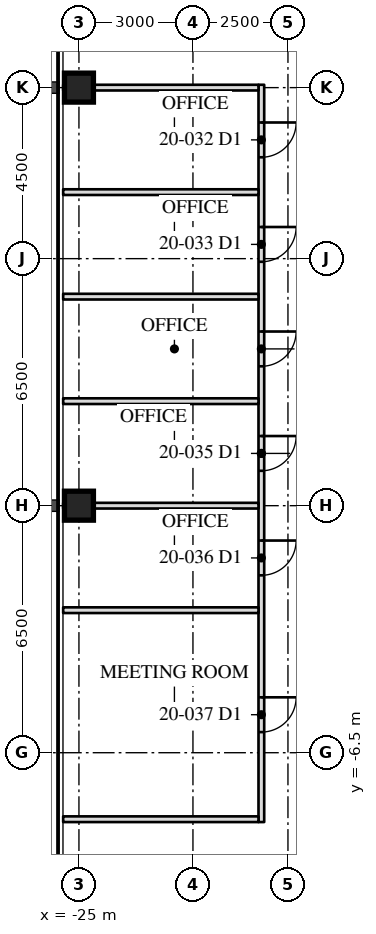
"""IFC4 building model, lengths in metres.
Left out: names, types, materials, properties, quantities, classifications, styles, units other than length and angle.
Written with IfcOpenShell. Run it as: python <this file> out.ifc"""

import sys

from ifc_helpers import new_model, si_unit, direction, frame, frame_2d, origin, origin_2d, place, context, subcontext, project, spatial, rectangle, hollow_rectangle, extrude, element, fill, save


model = new_model("IFC4")
c1 = context("Model", 3, precision=1e-05, world=origin(), true_north=direction((0.0, 1.0)))
c2 = subcontext(c1, "Body", "Model", "MODEL_VIEW")
j1 = project(units=[si_unit("LENGTHUNIT", "METRE"), si_unit("PLANEANGLEUNIT", "RADIAN")], contexts=[c1])
p1 = place(None, origin())
s1 = spatial("IfcSite", under=j1, at=p1, CompositionType="ELEMENT")
p2 = place(p1, origin())
s2 = spatial("IfcBuilding", under=s1, at=p2, CompositionType="ELEMENT")
p3 = place(p2, frame((0.0, 0.0, 85.7)))
s3 = spatial("IfcBuildingStorey", under=s2, at=p3, CompositionType="ELEMENT", Elevation=85.7)
for number, where, z_axis, x_axis in (
    (1, (-25.0, 0.0, 0.0), (0.0, 0.0, 1.0), (0.0, 1.0, 0.0)),
    (2, (-25.0, 11.0, 0.0), (0.0, 0.0, 1.0), (0.0, 1.0, 0.0)),
):
    element("IfcColumn", number, at=place(p3, frame(where, z_axis=z_axis, x_axis=x_axis)), inside=s3, PredefinedType="COLUMN", context=c2, shape_type="SweptSolid", body=[
        extrude(hollow_rectangle(XDim=0.762, YDim=0.762, WallThickness=0.127, at=origin_2d()), origin(), (0.0, 0.0, 1.0), 4.1),
    ])
p4 = place(p3, frame((-20.2, 11.075, 0.0), z_axis=(0.0, 0.0, 1.0), x_axis=(0.0, -1.0, 0.0)))
e3 = element("IfcWall", 3, at=p4, inside=s3, PredefinedType="PARTITIONING", context=c2, shape_type="SweptSolid", body=[
    extrude(rectangle(XDim=19.4, YDim=0.15, at=frame_2d((9.7, 0.0))), origin(), (0.0, 0.0, 1.0), 3.91),
])
p5 = place(p4, frame((0.992, 0.0, 0.0)))
e4 = element("IfcOpeningElement", 4, at=p5, cuts=e3, PredefinedType="OPENING", context=c2, shape_type="SweptSolid", body=[
    extrude(rectangle(XDim=0.915, YDim=2.134, at=frame_2d((0.458, 1.067))), frame((0.0, 0.085, 0.0), z_axis=(0.0, -1.0, 0.0), x_axis=(1.0, 0.0, 0.0)), (0.0, 0.0, 1.0), 0.17),
])
p6 = place(p4, frame((3.742, 0.0, 0.0)))
e5 = element("IfcOpeningElement", 5, at=p6, cuts=e3, PredefinedType="OPENING", context=c2, shape_type="SweptSolid", body=[
    extrude(rectangle(XDim=0.915, YDim=2.134, at=frame_2d((0.458, 1.067))), frame((0.0, 0.085, 0.0), z_axis=(0.0, -1.0, 0.0), x_axis=(1.0, 0.0, 0.0)), (0.0, 0.0, 1.0), 0.17),
])
p7 = place(p4, frame((6.492, 0.0, 0.0)))
e6 = element("IfcOpeningElement", 6, at=p7, cuts=e3, PredefinedType="OPENING", context=c2, shape_type="SweptSolid", body=[
    extrude(rectangle(XDim=0.915, YDim=2.134, at=frame_2d((0.458, 1.067))), frame((0.0, 0.085, 0.0), z_axis=(0.0, -1.0, 0.0), x_axis=(1.0, 0.0, 0.0)), (0.0, 0.0, 1.0), 0.17),
])
p8 = place(p4, frame((9.242, 0.0, 0.0)))
e7 = element("IfcOpeningElement", 7, at=p8, cuts=e3, PredefinedType="OPENING", context=c2, shape_type="SweptSolid", body=[
    extrude(rectangle(XDim=0.915, YDim=2.134, at=frame_2d((0.458, 1.067))), frame((0.0, 0.085, 0.0), z_axis=(0.0, -1.0, 0.0), x_axis=(1.0, 0.0, 0.0)), (0.0, 0.0, 1.0), 0.17),
])
p9 = place(p4, frame((11.992, 0.0, 0.0)))
e8 = element("IfcOpeningElement", 8, at=p9, cuts=e3, PredefinedType="OPENING", context=c2, shape_type="SweptSolid", body=[
    extrude(rectangle(XDim=0.915, YDim=2.134, at=frame_2d((0.458, 1.067))), frame((0.0, 0.085, 0.0), z_axis=(0.0, -1.0, 0.0), x_axis=(1.0, 0.0, 0.0)), (0.0, 0.0, 1.0), 0.17),
])
p10 = place(p4, frame((16.117, 0.0, 0.0)))
e9 = element("IfcOpeningElement", 9, at=p10, cuts=e3, PredefinedType="OPENING", context=c2, shape_type="SweptSolid", body=[
    extrude(rectangle(XDim=0.915, YDim=2.134, at=frame_2d((0.458, 1.067))), frame((0.0, 0.085, 0.0), z_axis=(0.0, -1.0, 0.0), x_axis=(1.0, 0.0, 0.0)), (0.0, 0.0, 1.0), 0.17),
])
p11 = place(p3, frame((-20.275, 11.0, 0.0), z_axis=(0.0, 0.0, 1.0), x_axis=(-1.0, 0.0, 0.0)))
e10 = element("IfcWall", 10, at=p11, inside=s3, PredefinedType="PARTITIONING", context=c2, shape_type="SweptSolid", body=[
    extrude(rectangle(XDim=5.14, YDim=0.15, at=frame_2d((2.57, 0.0))), origin(), (0.0, 0.0, 1.0), 3.301),
])
for number, where, z_axis, x_axis in (
    (11, (-20.275, 8.25, 0.0), (0.0, 0.0, 1.0), (-1.0, 0.0, 0.0)),
    (12, (-20.275, 5.5, 0.0), (0.0, 0.0, 1.0), (-1.0, 0.0, 0.0)),
    (13, (-20.275, 2.75, 0.0), (0.0, 0.0, 1.0), (-1.0, 0.0, 0.0)),
):
    element("IfcWall", number, at=place(p3, frame(where, z_axis=z_axis, x_axis=x_axis)), inside=s3, PredefinedType="PARTITIONING", context=c2, shape_type="SweptSolid", body=[
        extrude(rectangle(XDim=5.14, YDim=0.15, at=frame_2d((2.57, 0.0))), origin(), (0.0, 0.0, 1.0), 3.91),
    ])
p12 = place(p3, frame((-20.275, 0.0, 0.0), z_axis=(0.0, 0.0, 1.0), x_axis=(-1.0, 0.0, 0.0)))
e14 = element("IfcWall", 14, at=p12, inside=s3, PredefinedType="PARTITIONING", context=c2, shape_type="SweptSolid", body=[
    extrude(rectangle(XDim=5.14, YDim=0.15, at=frame_2d((2.57, 0.0))), origin(), (0.0, 0.0, 1.0), 3.301),
])
for number, where, z_axis, x_axis in (
    (15, (-20.275, -2.75, 0.0), (0.0, 0.0, 1.0), (-1.0, 0.0, 0.0)),
    (16, (-20.275, -8.25, 0.0), (0.0, 0.0, 1.0), (-1.0, 0.0, 0.0)),
):
    element("IfcWall", number, at=place(p3, frame(where, z_axis=z_axis, x_axis=x_axis)), inside=s3, PredefinedType="PARTITIONING", context=c2, shape_type="SweptSolid", body=[
        extrude(rectangle(XDim=5.14, YDim=0.15, at=frame_2d((2.57, 0.0))), origin(), (0.0, 0.0, 1.0), 3.91),
    ])
p13 = place(p5, origin())
e17 = element("IfcDoor", 17, at=p13, inside=s3, OperationType="SINGLE_SWING_LEFT", PredefinedType="DOOR", context=c2, shape_type="SweptSolid", body=[
    extrude(rectangle(XDim=0.915, YDim=2.134, at=frame_2d((0.458, 1.067))), frame((0.0, 0.025, 0.0), z_axis=(0.0, -1.0, 0.0), x_axis=(1.0, 0.0, 0.0)), (0.0, 0.0, 1.0), 0.05),
])
fill(e4, e17)
p14 = place(p6, origin())
e18 = element("IfcDoor", 18, at=p14, inside=s3, OperationType="SINGLE_SWING_LEFT", PredefinedType="DOOR", context=c2, shape_type="SweptSolid", body=[
    extrude(rectangle(XDim=0.915, YDim=2.134, at=frame_2d((0.458, 1.067))), frame((0.0, 0.025, 0.0), z_axis=(0.0, -1.0, 0.0), x_axis=(1.0, 0.0, 0.0)), (0.0, 0.0, 1.0), 0.05),
])
fill(e5, e18)
p15 = place(p7, origin())
e19 = element("IfcDoor", 19, at=p15, inside=s3, OperationType="SINGLE_SWING_LEFT", PredefinedType="DOOR", context=c2, shape_type="SweptSolid", body=[
    extrude(rectangle(XDim=0.915, YDim=2.134, at=frame_2d((0.458, 1.067))), frame((0.0, 0.025, 0.0), z_axis=(0.0, -1.0, 0.0), x_axis=(1.0, 0.0, 0.0)), (0.0, 0.0, 1.0), 0.05),
])
fill(e6, e19)
p16 = place(p8, origin())
e20 = element("IfcDoor", 20, at=p16, inside=s3, OperationType="SINGLE_SWING_LEFT", PredefinedType="DOOR", context=c2, shape_type="SweptSolid", body=[
    extrude(rectangle(XDim=0.915, YDim=2.134, at=frame_2d((0.458, 1.067))), frame((0.0, 0.025, 0.0), z_axis=(0.0, -1.0, 0.0), x_axis=(1.0, 0.0, 0.0)), (0.0, 0.0, 1.0), 0.05),
])
fill(e7, e20)
p17 = place(p9, origin())
e21 = element("IfcDoor", 21, at=p17, inside=s3, OperationType="SINGLE_SWING_LEFT", PredefinedType="DOOR", context=c2, shape_type="SweptSolid", body=[
    extrude(rectangle(XDim=0.915, YDim=2.134, at=frame_2d((0.458, 1.067))), frame((0.0, 0.025, 0.0), z_axis=(0.0, -1.0, 0.0), x_axis=(1.0, 0.0, 0.0)), (0.0, 0.0, 1.0), 0.05),
])
fill(e8, e21)
p18 = place(p10, origin())
e22 = element("IfcDoor", 22, at=p18, inside=s3, OperationType="SINGLE_SWING_LEFT", PredefinedType="DOOR", context=c2, shape_type="SweptSolid", body=[
    extrude(rectangle(XDim=0.915, YDim=2.134, at=frame_2d((0.458, 1.067))), frame((0.0, 0.025, 0.0), z_axis=(0.0, -1.0, 0.0), x_axis=(1.0, 0.0, 0.0)), (0.0, 0.0, 1.0), 0.05),
])
fill(e9, e22)
save(model, sys.argv[1])
